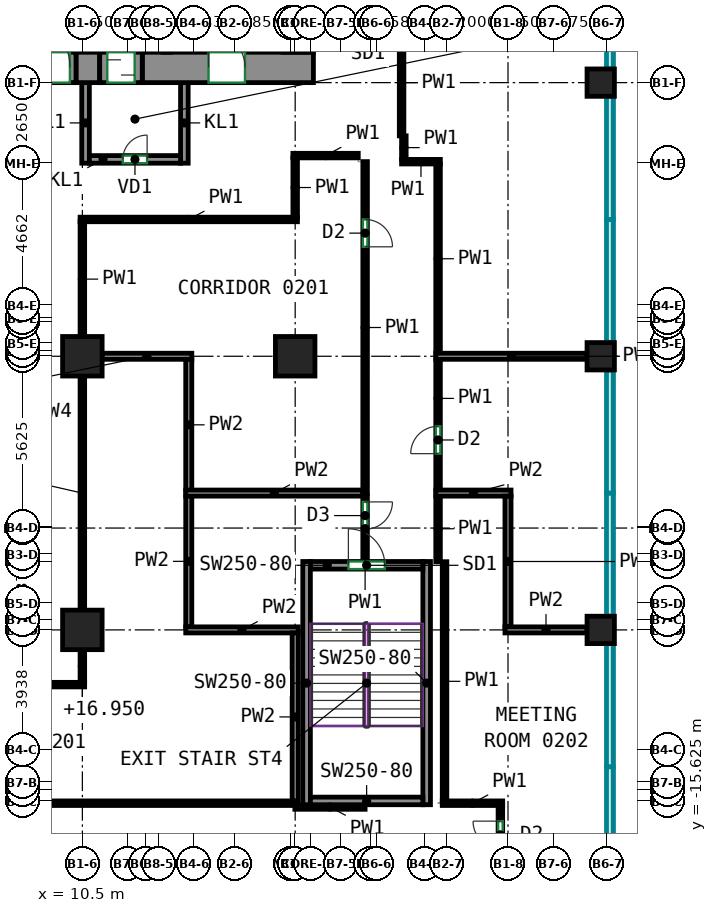
"""IFC4 building model, lengths in metres.
Left out: names, types, materials, properties, quantities, classifications, styles, units other than length and angle.
Written with IfcOpenShell. Run it as: python <this file> out.ifc"""

import sys

from ifc_helpers import new_model, si_unit, direction, frame, frame_2d, origin, origin_2d, place, context, subcontext, project, spatial, rectangle, extrude, source, transform, mapped, element, fill, save


model = new_model("IFC4")
c1 = context("Model", 3, precision=1e-05, world=origin(), true_north=direction((0.0, 1.0)))
c2 = subcontext(c1, "Body", "Model", "MODEL_VIEW")
j1 = project(units=[si_unit("LENGTHUNIT", "METRE"), si_unit("PLANEANGLEUNIT", "RADIAN")], contexts=[c1])
p1 = place(None, origin())
s1 = spatial("IfcSite", under=j1, at=p1, CompositionType="ELEMENT")
p2 = place(p1, origin())
s2 = spatial("IfcBuilding", under=s1, at=p2, CompositionType="ELEMENT")
p3 = place(p2, frame((0.0, 0.0, 13.5)))
s3 = spatial("IfcBuildingStorey", under=s2, at=p3, CompositionType="ELEMENT", Elevation=13.5)
m1 = source(origin(), c2, "Body", "SweptSolid", [
    extrude(rectangle(XDim=1.3, YDim=1.3, at=origin_2d()), origin(), (0.0, 0.0, 1.0), 4.1),
])
for number, where, z_axis, x_axis in (
    (1, (10.5, -10.0, 0.0), (0.0, 0.0, 1.0), (1.0, 0.0, 0.0)),
    (2, (10.5, -1.0, 0.0), (0.0, 0.0, 1.0), (1.0, 0.0, 0.0)),
    (3, (17.5, -1.0, 0.0), (0.0, 0.0, 1.0), (1.0, 0.0, 0.0)),
):
    element("IfcColumn", number, at=place(p3, frame(where, z_axis=z_axis, x_axis=x_axis)), inside=s3, PredefinedType="COLUMN", context=c2, shape_type="MappedRepresentation", body=[
        mapped(m1, transform((0.0, 0.0, 0.0))),
    ])
m2 = source(origin(), c2, "Body", "SweptSolid", [
    extrude(rectangle(XDim=0.9, YDim=0.9, at=origin_2d()), origin(), (0.0, 0.0, 1.0), 4.1),
])
for number, where, z_axis, x_axis in (
    (4, (27.55, -10.0, 0.0), (0.0, 0.0, 1.0), (1.0, 0.0, 0.0)),
    (5, (27.55, -1.0, 0.0), (0.0, 0.0, 1.0), (1.0, 0.0, 0.0)),
    (6, (27.55, 8.0, 0.0), (0.0, 0.0, 1.0), (1.0, 0.0, 0.0)),
):
    element("IfcColumn", number, at=place(p3, frame(where, z_axis=z_axis, x_axis=x_axis)), inside=s3, PredefinedType="COLUMN", context=c2, shape_type="MappedRepresentation", body=[
        mapped(m2, transform((0.0, 0.0, 0.0))),
    ])
m3 = source(origin(), c2, "Body", "SweptSolid", [
    extrude(rectangle(XDim=0.78, YDim=1.0, at=frame_2d((0.39, 0.0))), origin(), (0.0, 0.0, 1.0), 4.1),
])
p4 = place(p3, frame((10.29, 8.5, 0.0), z_axis=(0.0, 0.0, 1.0), x_axis=(1.0, 0.0, 0.0)))
e7 = element("IfcWall", 7, at=p4, inside=s3, PredefinedType="SHEAR", context=c2, shape_type="MappedRepresentation", body=[
    mapped(m3, transform((0.0, 0.0, 0.0))),
])
m4 = source(origin(), c2, "Body", "SweptSolid", [
    extrude(rectangle(XDim=5.63, YDim=1.0, at=frame_2d((2.815, 0.0))), origin(), (0.0, 0.0, 1.0), 4.1),
])
p5 = place(p3, frame((12.47, 8.5, 0.0), z_axis=(0.0, 0.0, 1.0), x_axis=(1.0, 0.0, 0.0)))
e8 = element("IfcWall", 8, at=p5, inside=s3, PredefinedType="SHEAR", context=c2, shape_type="MappedRepresentation", body=[
    mapped(m4, transform((0.0, 0.0, 0.0))),
])
p6 = place(p5, frame((2.18, 0.0, 0.0)))
e9 = element("IfcOpeningElement", 9, at=p6, cuts=e8, PredefinedType="OPENING", context=c2, shape_type="SweptSolid", body=[
    extrude(rectangle(XDim=1.2, YDim=2.1, at=frame_2d((0.6, 1.05))), frame((0.0, 0.51, 0.0), z_axis=(0.0, -1.0, 0.0), x_axis=(1.0, 0.0, 0.0)), (0.0, 0.0, 1.0), 1.02),
])
m5 = source(origin(), c2, "Body", "SweptSolid", [
    extrude(rectangle(XDim=8.0, YDim=0.25, at=frame_2d((4.0, 0.0))), origin(), (0.0, 0.0, 1.0), 4.1),
])
for number, where, z_axis, x_axis in (
    (10, (17.875, -15.75, 0.0), (0.0, 0.0, 1.0), (0.0, 1.0, 0.0)),
    (11, (21.825, -15.75, 0.0), (0.0, 0.0, 1.0), (0.0, 1.0, 0.0)),
):
    element("IfcWall", number, at=place(p3, frame(where, z_axis=z_axis, x_axis=x_axis)), inside=s3, PredefinedType="SHEAR", context=c2, shape_type="MappedRepresentation", body=[
        mapped(m5, transform((0.0, 0.0, 0.0))),
    ])
m6 = source(origin(), c2, "Body", "SweptSolid", [
    extrude(rectangle(XDim=3.7, YDim=0.25, at=frame_2d((1.85, 0.0))), origin(), (0.0, 0.0, 1.0), 4.1),
])
p7 = place(p3, frame((18.0, -15.625, 0.0), z_axis=(0.0, 0.0, 1.0), x_axis=(1.0, 0.0, 0.0)))
e12 = element("IfcWall", 12, at=p7, inside=s3, PredefinedType="SHEAR", context=c2, shape_type="MappedRepresentation", body=[
    mapped(m6, transform((0.0, 0.0, 0.0))),
])
p8 = place(p3, frame((18.0, -7.875, 0.0), z_axis=(0.0, 0.0, 1.0), x_axis=(1.0, 0.0, 0.0)))
e13 = element("IfcWall", 13, at=p8, inside=s3, PredefinedType="SHEAR", context=c2, shape_type="MappedRepresentation", body=[
    mapped(m6, transform((0.0, 0.0, 0.0))),
])
p9 = place(p8, frame((1.25, 0.0, 0.0)))
e14 = element("IfcOpeningElement", 14, at=p9, cuts=e13, PredefinedType="OPENING", context=c2, shape_type="SweptSolid", body=[
    extrude(rectangle(XDim=1.2, YDim=2.1, at=frame_2d((0.6, 1.05))), frame((0.0, 0.135, 0.0), z_axis=(0.0, -1.0, 0.0), x_axis=(1.0, 0.0, 0.0)), (0.0, 0.0, 1.0), 0.27),
])
m7 = source(origin(), c2, "Body", "SweptSolid", [
    extrude(rectangle(XDim=2.65, YDim=0.25, at=frame_2d((1.325, 0.0))), origin(), (0.0, 0.0, 1.0), 4.1),
])
for number, where, z_axis, x_axis in (
    (15, (10.605, 5.35, 0.0), (0.0, 0.0, 1.0), (0.0, 1.0, 0.0)),
    (16, (13.855, 5.35, 0.0), (0.0, 0.0, 1.0), (0.0, 1.0, 0.0)),
):
    element("IfcWall", number, at=place(p3, frame(where, z_axis=z_axis, x_axis=x_axis)), inside=s3, PredefinedType="PARTITIONING", context=c2, shape_type="MappedRepresentation", body=[
        mapped(m7, transform((0.0, 0.0, 0.0))),
    ])
m8 = source(origin(), c2, "Body", "SweptSolid", [
    extrude(rectangle(XDim=3.0, YDim=0.25, at=frame_2d((1.5, 0.0))), origin(), (0.0, 0.0, 1.0), 4.1),
])
p10 = place(p3, frame((10.73, 5.475, 0.0), z_axis=(0.0, 0.0, 1.0), x_axis=(1.0, 0.0, 0.0)))
e17 = element("IfcWall", 17, at=p10, inside=s3, PredefinedType="PARTITIONING", context=c2, shape_type="MappedRepresentation", body=[
    mapped(m8, transform((0.0, 0.0, 0.0))),
])
p11 = place(p10, frame((1.1, 0.0, 0.0)))
e18 = element("IfcOpeningElement", 18, at=p11, cuts=e17, PredefinedType="OPENING", context=c2, shape_type="SweptSolid", body=[
    extrude(rectangle(XDim=0.8, YDim=2.0, at=frame_2d((0.4, 1.0))), frame((0.0, 0.135, 0.0), z_axis=(0.0, -1.0, 0.0), x_axis=(1.0, 0.0, 0.0)), (0.0, 0.0, 1.0), 0.27),
])
m9 = source(origin(), c2, "Body", "SweptSolid", [
    extrude(rectangle(XDim=2.4, YDim=1.0, at=frame_2d((1.2, 0.0))), origin(), (0.0, 0.0, 1.0), 2.7),
])
p12 = place(p3, frame((7.89, 8.5, 0.0), z_axis=(0.0, 0.0, 1.0), x_axis=(1.0, 0.0, 0.0)))
e19 = element("IfcWall", 19, at=p12, inside=s3, PredefinedType="PARTITIONING", context=c2, shape_type="MappedRepresentation", body=[
    mapped(m9, transform((0.0, 0.0, 0.0))),
])
p13 = place(p12, frame((0.2, 0.0, 0.0)))
e20 = element("IfcOpeningElement", 20, at=p13, cuts=e19, PredefinedType="OPENING", context=c2, shape_type="SweptSolid", body=[
    extrude(rectangle(XDim=2.0, YDim=2.1, at=frame_2d((1.0, 1.05))), frame((0.0, 0.51, 0.0), z_axis=(0.0, -1.0, 0.0), x_axis=(1.0, 0.0, 0.0)), (0.0, 0.0, 1.0), 1.02),
])
m10 = source(origin(), c2, "Body", "SweptSolid", [
    extrude(rectangle(XDim=1.4, YDim=1.0, at=frame_2d((0.7, 0.0))), origin(), (0.0, 0.0, 1.0), 2.7),
])
p14 = place(p3, frame((11.07, 8.5, 0.0), z_axis=(0.0, 0.0, 1.0), x_axis=(1.0, 0.0, 0.0)))
e21 = element("IfcWall", 21, at=p14, inside=s3, PredefinedType="PARTITIONING", context=c2, shape_type="MappedRepresentation", body=[
    mapped(m10, transform((0.0, 0.0, 0.0))),
])
p15 = place(p14, frame((0.25, 0.0, 0.0)))
e22 = element("IfcOpeningElement", 22, at=p15, cuts=e21, PredefinedType="OPENING", context=c2, shape_type="SweptSolid", body=[
    extrude(rectangle(XDim=0.9, YDim=2.1, at=frame_2d((0.45, 1.05))), frame((0.0, 0.51, 0.0), z_axis=(0.0, -1.0, 0.0), x_axis=(1.0, 0.0, 0.0)), (0.0, 0.0, 1.0), 1.02),
])
p16 = place(p3, frame((10.5, -9.35, 0.0), z_axis=(0.0, 0.0, 1.0), x_axis=(0.0, 1.0, 0.0)))
e23 = element("IfcWall", 23, at=p16, inside=s3, PredefinedType="PARTITIONING", context=c2, shape_type="SweptSolid", body=[
    extrude(rectangle(XDim=7.7, YDim=0.15, at=frame_2d((3.85, 0.0))), origin(), (0.0, 0.0, 1.0), 3.45),
])
p17 = place(p3, frame((10.5, -11.725, 0.0), z_axis=(0.0, 0.0, 1.0), x_axis=(0.0, 1.0, 0.0)))
e24 = element("IfcWall", 24, at=p17, inside=s3, PredefinedType="PARTITIONING", context=c2, shape_type="SweptSolid", body=[
    extrude(rectangle(XDim=1.075, YDim=0.15, at=frame_2d((0.538, 0.0))), origin(), (0.0, 0.0, 1.0), 3.45),
])
p18 = place(p3, frame((-5.875, -11.8, 0.0), z_axis=(0.0, 0.0, 1.0), x_axis=(1.0, 0.0, 0.0)))
e25 = element("IfcWall", 25, at=p18, inside=s3, PredefinedType="PARTITIONING", context=c2, shape_type="SweptSolid", body=[
    extrude(rectangle(XDim=16.45, YDim=0.15, at=frame_2d((8.225, 0.0))), origin(), (0.0, 0.0, 1.0), 4.1),
])
p19 = place(p3, frame((-5.875, -15.7, 0.0), z_axis=(0.0, 0.0, 1.0), x_axis=(1.0, 0.0, 0.0)))
e26 = element("IfcWall", 26, at=p19, inside=s3, PredefinedType="PARTITIONING", context=c2, shape_type="SweptSolid", body=[
    extrude(rectangle(XDim=23.385, YDim=0.15, at=frame_2d((11.692, 0.0))), origin(), (0.0, 0.0, 1.0), 4.1),
])
p20 = place(p19, frame((10.54, 0.0, 0.0)))
e27 = element("IfcOpeningElement", 27, at=p20, cuts=e26, PredefinedType="OPENING", context=c2, shape_type="SweptSolid", body=[
    extrude(rectangle(XDim=1.0, YDim=2.1, at=frame_2d((0.5, 1.05))), frame((0.0, 0.085, 0.0), z_axis=(0.0, -1.0, 0.0), x_axis=(1.0, 0.0, 0.0)), (0.0, 0.0, 1.0), 0.17),
])
p21 = place(p3, frame((21.0, 6.25, 0.0), z_axis=(0.0, 0.0, 1.0), x_axis=(0.0, 1.0, 0.0)))
e28 = element("IfcWall", 28, at=p21, inside=s3, PredefinedType="PARTITIONING", context=c2, shape_type="SweptSolid", body=[
    extrude(rectangle(XDim=3.5, YDim=0.15, at=frame_2d((1.75, 0.0))), origin(), (0.0, 0.0, 1.0), 4.1),
])
p22 = place(p3, frame((21.075, 5.475, 0.0), z_axis=(0.0, 0.0, 1.0), x_axis=(0.0, 1.0, 0.0)))
e29 = element("IfcWall", 29, at=p22, inside=s3, PredefinedType="PARTITIONING", context=c2, shape_type="SweptSolid", body=[
    extrude(rectangle(XDim=0.775, YDim=0.15, at=frame_2d((0.387, 0.0))), origin(), (0.0, 0.0, 1.0), 4.1),
])
p23 = place(p3, frame((22.275, 5.4, 0.0), z_axis=(0.0, 0.0, 1.0), x_axis=(-1.0, 0.0, 0.0)))
e30 = element("IfcWall", 30, at=p23, inside=s3, PredefinedType="PARTITIONING", context=c2, shape_type="SweptSolid", body=[
    extrude(rectangle(XDim=1.275, YDim=0.15, at=frame_2d((0.637, 0.0))), origin(), (0.0, 0.0, 1.0), 4.1),
])
p24 = place(p3, frame((22.2, -0.91, 0.0), z_axis=(0.0, 0.0, 1.0), x_axis=(0.0, 1.0, 0.0)))
e31 = element("IfcWall", 31, at=p24, inside=s3, PredefinedType="PARTITIONING", context=c2, shape_type="SweptSolid", body=[
    extrude(rectangle(XDim=6.235, YDim=0.15, at=frame_2d((3.117, 0.0))), origin(), (0.0, 0.0, 1.0), 4.1),
])
p25 = place(p3, frame((10.425, 3.5, 0.0), z_axis=(0.0, 0.0, 1.0), x_axis=(1.0, 0.0, 0.0)))
e32 = element("IfcWall", 32, at=p25, inside=s3, PredefinedType="PARTITIONING", context=c2, shape_type="SweptSolid", body=[
    extrude(rectangle(XDim=7.15, YDim=0.15, at=frame_2d((3.575, 0.0))), origin(), (0.0, 0.0, 1.0), 4.1),
])
p26 = place(p3, frame((10.5, -0.35, 0.0), z_axis=(0.0, 0.0, 1.0), x_axis=(0.0, 1.0, 0.0)))
e33 = element("IfcWall", 33, at=p26, inside=s3, PredefinedType="PARTITIONING", context=c2, shape_type="SweptSolid", body=[
    extrude(rectangle(XDim=3.775, YDim=0.15, at=frame_2d((1.888, 0.0))), origin(), (0.0, 0.0, 1.0), 4.1),
])
p27 = place(p3, frame((19.801, 5.402, 0.0), z_axis=(0.0, 0.0, 1.0), x_axis=(-8.9493467e-05, -0.999999995995, 0.0)))
e34 = element("IfcWall", 34, at=p27, inside=s3, PredefinedType="PARTITIONING", context=c2, shape_type="SweptSolid", body=[
    extrude(rectangle(XDim=10.912, YDim=0.15, at=frame_2d((5.456, 0.0))), origin(), (0.0, 0.0, 1.0), 4.1),
])
p28 = place(p27, frame((1.902, 0.0, 0.0)))
e35 = element("IfcOpeningElement", 35, at=p28, cuts=e34, PredefinedType="OPENING", context=c2, shape_type="SweptSolid", body=[
    extrude(rectangle(XDim=0.9, YDim=2.1, at=frame_2d((0.45, 1.05))), frame((0.0, 0.085, 0.0), z_axis=(0.0, -1.0, 0.0), x_axis=(1.0, 0.0, 0.0)), (0.0, 0.0, 1.0), 0.17),
])
p29 = place(p3, frame((17.425, 5.6, 0.0), z_axis=(0.0, 0.0, 1.0), x_axis=(1.0, 0.0, 0.0)))
e36 = element("IfcWall", 36, at=p29, inside=s3, PredefinedType="PARTITIONING", context=c2, shape_type="SweptSolid", body=[
    extrude(rectangle(XDim=2.15, YDim=0.15, at=frame_2d((1.075, 0.0))), origin(), (0.0, 0.0, 1.0), 4.1),
])
p30 = place(p3, frame((17.5, 3.575, 0.0), z_axis=(0.0, 0.0, 1.0), x_axis=(0.0, 1.0, 0.0)))
e37 = element("IfcWall", 37, at=p30, inside=s3, PredefinedType="PARTITIONING", context=c2, shape_type="SweptSolid", body=[
    extrude(rectangle(XDim=1.95, YDim=0.15, at=frame_2d((0.975, 0.0))), origin(), (0.0, 0.0, 1.0), 4.1),
])
p31 = place(p3, frame((17.49, -15.825, 0.0), z_axis=(0.0, 0.0, 1.0), x_axis=(1.0, 0.0, 0.0)))
e38 = element("IfcWall", 38, at=p31, inside=s3, PredefinedType="PARTITIONING", context=c2, shape_type="SweptSolid", body=[
    extrude(rectangle(XDim=2.31, YDim=0.15, at=frame_2d((1.155, 0.0))), origin(), (0.0, 0.0, 1.0), 4.1),
])
p32 = place(p3, frame((19.8, -5.59, 0.0), z_axis=(0.0, 0.0, 1.0), x_axis=(0.0, -1.0, 0.0)))
e39 = element("IfcWall", 39, at=p32, inside=s3, PredefinedType="PARTITIONING", context=c2, shape_type="SweptSolid", body=[
    extrude(rectangle(XDim=2.16, YDim=0.15, at=frame_2d((1.08, 0.0))), origin(), (0.0, 0.0, 1.0), 4.1),
])
p33 = place(p32, frame((0.2, 0.0, 0.0)))
e40 = element("IfcOpeningElement", 40, at=p33, cuts=e39, PredefinedType="OPENING", context=c2, shape_type="SweptSolid", body=[
    extrude(rectangle(XDim=0.9, YDim=2.1, at=frame_2d((0.45, 1.05))), frame((0.0, 0.085, 0.0), z_axis=(0.0, -1.0, 0.0), x_axis=(1.0, 0.0, 0.0)), (0.0, 0.0, 1.0), 0.17),
])
p34 = place(p3, frame((22.2, -7.757, 0.0), z_axis=(0.0, 0.0, 1.0), x_axis=(0.0, 1.0, 0.0)))
e41 = element("IfcWall", 41, at=p34, inside=s3, PredefinedType="PARTITIONING", context=c2, shape_type="SweptSolid", body=[
    extrude(rectangle(XDim=2.167, YDim=0.15, at=frame_2d((1.083, 0.0))), origin(), (0.0, 0.0, 1.0), 4.1),
])
p35 = place(p3, frame((22.413, -15.625, 0.0), z_axis=(0.0, 0.0, 1.0), x_axis=(0.0, 1.0, 0.0)))
e42 = element("IfcWall", 42, at=p35, inside=s3, PredefinedType="PARTITIONING", context=c2, shape_type="SweptSolid", body=[
    extrude(rectangle(XDim=7.868, YDim=0.15, at=frame_2d((3.934, 0.0))), origin(), (0.0, 0.0, 1.0), 4.1),
])
p36 = place(p3, frame((22.338, -15.7, 0.0), z_axis=(0.0, 0.0, 1.0), x_axis=(1.0, 0.0, 0.0)))
e43 = element("IfcWall", 43, at=p36, inside=s3, PredefinedType="PARTITIONING", context=c2, shape_type="SweptSolid", body=[
    extrude(rectangle(XDim=1.987, YDim=0.15, at=frame_2d((0.994, 0.0))), origin(), (0.0, 0.0, 1.0), 4.1),
])
p37 = place(p3, frame((24.25, -18.125, 0.0), z_axis=(0.0, 0.0, 1.0), x_axis=(0.0, 1.0, 0.0)))
e44 = element("IfcWall", 44, at=p37, inside=s3, PredefinedType="PARTITIONING", context=c2, shape_type="SweptSolid", body=[
    extrude(rectangle(XDim=2.35, YDim=0.15, at=frame_2d((1.175, 0.0))), origin(), (0.0, 0.0, 1.0), 3.45),
])
p38 = place(p37, frame((0.935, 0.0, 0.0)))
e45 = element("IfcOpeningElement", 45, at=p38, cuts=e44, PredefinedType="OPENING", context=c2, shape_type="SweptSolid", body=[
    extrude(rectangle(XDim=0.9, YDim=2.1, at=frame_2d((0.45, 1.05))), frame((0.0, 0.085, 0.0), z_axis=(0.0, -1.0, 0.0), x_axis=(1.0, 0.0, 0.0)), (0.0, 0.0, 1.0), 0.17),
])
p39 = place(p3, frame((22.2, -5.41, 0.0), z_axis=(0.0, 0.0, 1.0), x_axis=(0.0, 1.0, 0.0)))
e46 = element("IfcWall", 46, at=p39, inside=s3, PredefinedType="PARTITIONING", context=c2, shape_type="SweptSolid", body=[
    extrude(rectangle(XDim=4.32, YDim=0.15, at=frame_2d((2.16, 0.0))), origin(), (0.0, 0.0, 1.0), 4.1),
])
p40 = place(p39, frame((1.207, 0.0, 0.0)))
e47 = element("IfcOpeningElement", 47, at=p40, cuts=e46, PredefinedType="OPENING", context=c2, shape_type="SweptSolid", body=[
    extrude(rectangle(XDim=0.9, YDim=2.1, at=frame_2d((0.45, 1.05))), frame((0.0, 0.085, 0.0), z_axis=(0.0, -1.0, 0.0), x_axis=(1.0, 0.0, 0.0)), (0.0, 0.0, 1.0), 0.17),
])
p41 = place(p3, frame((11.15, -1.0, 0.0), z_axis=(0.0, 0.0, 1.0), x_axis=(1.0, 0.0, 0.0)))
e48 = element("IfcWall", 48, at=p41, inside=s3, PredefinedType="PARTITIONING", context=c2, shape_type="SweptSolid", body=[
    extrude(rectangle(XDim=2.95, YDim=0.2, at=frame_2d((1.475, 0.0))), origin(), (0.0, 0.0, 1.0), 3.45),
])
for number, where, z_axis, x_axis in (
    (49, (14.0, -5.41, 0.0), (0.0, 0.0, 1.0), (0.0, 1.0, 0.0)),
    (50, (14.0, -9.9, 0.0), (0.0, 0.0, 1.0), (0.0, 1.0, 0.0)),
):
    element("IfcWall", number, at=place(p3, frame(where, z_axis=z_axis, x_axis=x_axis)), inside=s3, PredefinedType="PARTITIONING", context=c2, shape_type="SweptSolid", body=[
        extrude(rectangle(XDim=4.31, YDim=0.2, at=frame_2d((2.155, 0.0))), origin(), (0.0, 0.0, 1.0), 4.1),
    ])
p42 = place(p3, frame((13.9, -10.0, 0.0), z_axis=(0.0, 0.0, 1.0), x_axis=(1.0, 0.0, 0.0)))
e51 = element("IfcWall", 51, at=p42, inside=s3, PredefinedType="PARTITIONING", context=c2, shape_type="SweptSolid", body=[
    extrude(rectangle(XDim=3.7, YDim=0.2, at=frame_2d((1.85, 0.0))), origin(), (0.0, 0.0, 1.0), 4.1),
])
p43 = place(p3, frame((17.5, -15.624, 0.0), z_axis=(0.0, 0.0, 1.0), x_axis=(0.0, 1.0, 0.0)))
e52 = element("IfcWall", 52, at=p43, inside=s3, PredefinedType="PARTITIONING", context=c2, shape_type="SweptSolid", body=[
    extrude(rectangle(XDim=5.524, YDim=0.2, at=frame_2d((2.762, 0.0))), origin(), (0.0, 0.0, 1.0), 4.1),
])
p44 = place(p3, frame((22.126, -1.0, 0.0), z_axis=(0.0, 0.0, 1.0), x_axis=(1.0, 0.0, 0.0)))
e53 = element("IfcWall", 53, at=p44, inside=s3, PredefinedType="PARTITIONING", context=c2, shape_type="SweptSolid", body=[
    extrude(rectangle(XDim=4.974, YDim=0.2, at=frame_2d((2.487, 0.0))), origin(), (0.0, 0.0, 1.0), 3.45),
])
p45 = place(p3, frame((13.9, -5.5, 0.0), z_axis=(0.0, 0.0, 1.0), x_axis=(1.0, 0.0, 0.0)))
e54 = element("IfcWall", 54, at=p45, inside=s3, PredefinedType="PARTITIONING", context=c2, shape_type="SweptSolid", body=[
    extrude(rectangle(XDim=5.825, YDim=0.2, at=frame_2d((2.913, 0.0))), origin(), (0.0, 0.0, 1.0), 4.1),
])
p46 = place(p3, frame((22.126, -5.5, 0.0), z_axis=(0.0, 0.0, 1.0), x_axis=(1.0, 0.0, 0.0)))
e55 = element("IfcWall", 55, at=p46, inside=s3, PredefinedType="PARTITIONING", context=c2, shape_type="SweptSolid", body=[
    extrude(rectangle(XDim=2.474, YDim=0.2, at=frame_2d((1.237, 0.0))), origin(), (0.0, 0.0, 1.0), 4.1),
])
p47 = place(p3, frame((24.5, -9.9, 0.0), z_axis=(0.0, 0.0, 1.0), x_axis=(0.0, 1.0, 0.0)))
e56 = element("IfcWall", 56, at=p47, inside=s3, PredefinedType="PARTITIONING", context=c2, shape_type="SweptSolid", body=[
    extrude(rectangle(XDim=4.3, YDim=0.2, at=frame_2d((2.15, 0.0))), origin(), (0.0, 0.0, 1.0), 3.45),
])
p48 = place(p3, frame((24.4, -10.0, 0.0), z_axis=(0.0, 0.0, 1.0), x_axis=(1.0, 0.0, 0.0)))
e57 = element("IfcWall", 57, at=p48, inside=s3, PredefinedType="PARTITIONING", context=c2, shape_type="SweptSolid", body=[
    extrude(rectangle(XDim=2.7, YDim=0.2, at=frame_2d((1.35, 0.0))), origin(), (0.0, 0.0, 1.0), 4.1),
])
p49 = place(p13, origin())
e58 = element("IfcDoor", 58, at=p49, inside=s3, OperationType="DOUBLE_DOOR_SINGLE_SWING", PredefinedType="DOOR", context=c2, shape_type="SweptSolid", body=[
    extrude(rectangle(XDim=2.0, YDim=2.1, at=frame_2d((1.0, 1.05))), frame((0.0, 0.405, 0.0), z_axis=(0.0, -1.0, 0.0), x_axis=(1.0, 0.0, 0.0)), (0.0, 0.0, 1.0), 0.05),
])
fill(e20, e58)
p50 = place(p11, origin())
e59 = element("IfcDoor", 59, at=p50, inside=s3, OperationType="SINGLE_SWING_RIGHT", PredefinedType="DOOR", context=c2, shape_type="SweptSolid", body=[
    extrude(rectangle(XDim=0.8, YDim=2.0, at=frame_2d((0.4, 1.0))), frame((0.0, 0.025, 0.0), z_axis=(0.0, -1.0, 0.0), x_axis=(1.0, 0.0, 0.0)), (0.0, 0.0, 1.0), 0.05),
])
fill(e18, e59)
p51 = place(p15, origin())
e60 = element("IfcDoor", 60, at=p51, inside=s3, OperationType="SLIDING_TO_LEFT", PredefinedType="DOOR", context=c2, shape_type="SweptSolid", body=[
    extrude(rectangle(XDim=0.9, YDim=2.1, at=frame_2d((0.45, 1.05))), frame((0.0, 0.405, 0.0), z_axis=(0.0, -1.0, 0.0), x_axis=(1.0, 0.0, 0.0)), (0.0, 0.0, 1.0), 0.05),
])
fill(e22, e60)
p52 = place(p6, origin())
e61 = element("IfcDoor", 61, at=p52, inside=s3, OperationType="DOUBLE_DOOR_SINGLE_SWING", PredefinedType="DOOR", context=c2, shape_type="SweptSolid", body=[
    extrude(rectangle(XDim=1.2, YDim=2.1, at=frame_2d((0.6, 1.05))), frame((0.0, 0.405, 0.0), z_axis=(0.0, -1.0, 0.0), x_axis=(1.0, 0.0, 0.0)), (0.0, 0.0, 1.0), 0.05),
])
fill(e9, e61)
p53 = place(p9, origin())
e62 = element("IfcDoor", 62, at=p53, inside=s3, OperationType="DOUBLE_DOOR_SINGLE_SWING", PredefinedType="DOOR", context=c2, shape_type="SweptSolid", body=[
    extrude(rectangle(XDim=1.2, YDim=2.1, at=frame_2d((0.6, 1.05))), frame((0.0, 0.025, 0.0), z_axis=(0.0, -1.0, 0.0), x_axis=(1.0, 0.0, 0.0)), (0.0, 0.0, 1.0), 0.05),
])
fill(e14, e62)
p54 = place(p38, origin())
e63 = element("IfcDoor", 63, at=p54, inside=s3, OperationType="SINGLE_SWING_RIGHT", PredefinedType="DOOR", context=c2, shape_type="SweptSolid", body=[
    extrude(rectangle(XDim=0.9, YDim=2.1, at=frame_2d((0.45, 1.05))), frame((0.0, 0.025, 0.0), z_axis=(0.0, -1.0, 0.0), x_axis=(1.0, 0.0, 0.0)), (0.0, 0.0, 1.0), 0.05),
])
fill(e45, e63)
p55 = place(p33, origin())
e64 = element("IfcDoor", 64, at=p55, inside=s3, OperationType="SINGLE_SWING_LEFT", PredefinedType="DOOR", context=c2, shape_type="SweptSolid", body=[
    extrude(rectangle(XDim=0.9, YDim=2.1, at=frame_2d((0.45, 1.05))), frame((0.0, 0.025, 0.0), z_axis=(0.0, -1.0, 0.0), x_axis=(1.0, 0.0, 0.0)), (0.0, 0.0, 1.0), 0.05),
])
fill(e40, e64)
p56 = place(p40, origin())
e65 = element("IfcDoor", 65, at=p56, inside=s3, OperationType="SINGLE_SWING_LEFT", PredefinedType="DOOR", context=c2, shape_type="SweptSolid", body=[
    extrude(rectangle(XDim=0.9, YDim=2.1, at=frame_2d((0.45, 1.05))), frame((0.0, 0.025, 0.0), z_axis=(0.0, -1.0, 0.0), x_axis=(1.0, 0.0, 0.0)), (0.0, 0.0, 1.0), 0.05),
])
fill(e47, e65)
p57 = place(p28, origin())
e66 = element("IfcDoor", 66, at=p57, inside=s3, OperationType="SINGLE_SWING_RIGHT", PredefinedType="DOOR", context=c2, shape_type="SweptSolid", body=[
    extrude(rectangle(XDim=0.9, YDim=2.1, at=frame_2d((0.45, 1.05))), frame((0.0, 0.025, 0.0), z_axis=(0.0, -1.0, 0.0), x_axis=(1.0, 0.0, 0.0)), (0.0, 0.0, 1.0), 0.05),
])
fill(e35, e66)
save(model, sys.argv[1])
